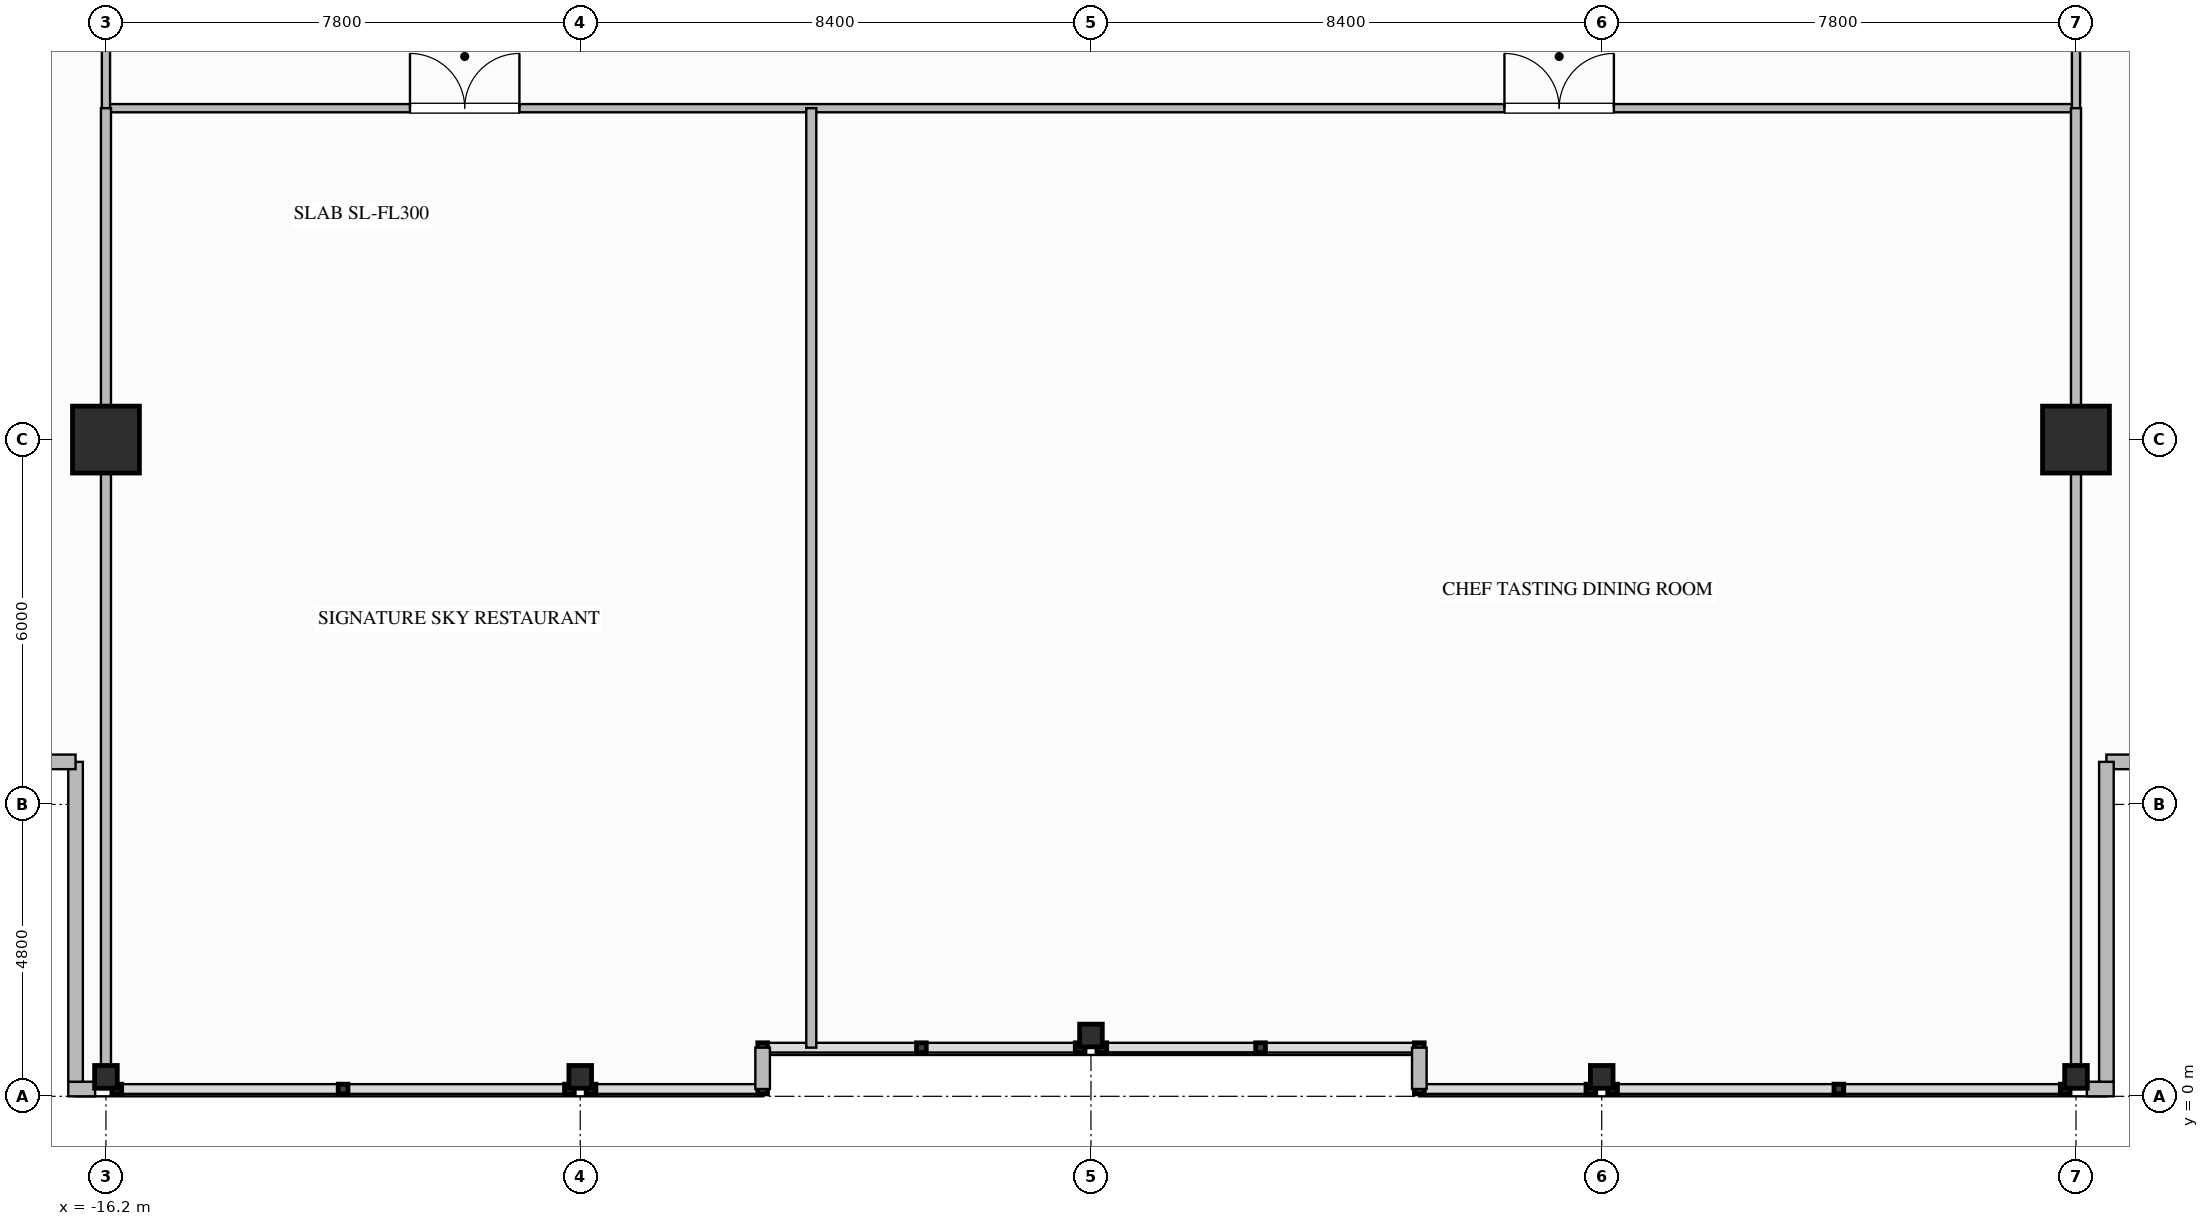
"""IFC4 building model, lengths in metres.
Left out: names, types, materials, properties, quantities, classifications, styles, units other than length and angle.
Written with IfcOpenShell. Run it as: python <this file> out.ifc"""

import sys

from ifc_helpers import new_model, si_unit, direction, frame, frame_2d, origin, origin_2d, place, context, subcontext, project, spatial, rectangle, i_section, extrude, element, fill, save


model = new_model("IFC4")
c1 = context("Model", 3, precision=1e-05, world=origin(), true_north=direction((0.0, 1.0)))
c2 = subcontext(c1, "Body", "Model", "MODEL_VIEW")
j1 = project(units=[si_unit("LENGTHUNIT", "METRE"), si_unit("PLANEANGLEUNIT", "RADIAN")], contexts=[c1])
p1 = place(None, origin())
s1 = spatial("IfcSite", under=j1, at=p1, CompositionType="ELEMENT")
p2 = place(p1, origin())
s2 = spatial("IfcBuilding", under=s1, at=p2, CompositionType="ELEMENT")
p3 = place(p2, frame((0.0, 0.0, 255.5)))
s3 = spatial("IfcBuildingStorey", under=s2, at=p3, CompositionType="ELEMENT", Elevation=255.5)
for number, where, z_axis, x_axis in (
    (1, (-16.2, 10.8, 0.0), (0.0, 0.0, 1.0), (1.0, 0.0, 0.0)),
    (2, (16.2, 10.8, 0.0), (0.0, 0.0, 1.0), (1.0, 0.0, 0.0)),
):
    element("IfcColumn", number, at=place(p3, frame(where, z_axis=z_axis, x_axis=x_axis)), inside=s3, PredefinedType="COLUMN", context=c2, shape_type="SweptSolid", body=[
        extrude(rectangle(XDim=1.1, YDim=1.1, at=origin_2d()), origin(), (0.0, 0.0, 1.0), 4.5),
    ])
for number, where, z_axis, x_axis in (
    (3, (-16.2, 0.32, 0.0), (0.0, 0.0, 1.0), (0.0, 1.0, 0.0)),
    (4, (-8.4, 0.32, 0.0), (0.0, 0.0, 1.0), (0.0, 1.0, 0.0)),
    (5, (0.0, 1.0, 0.0), (0.0, 0.0, 1.0), (0.0, 1.0, 0.0)),
    (6, (8.4, 0.32, 0.0), (0.0, 0.0, 1.0), (0.0, 1.0, 0.0)),
    (7, (16.2, 0.32, 0.0), (0.0, 0.0, 1.0), (0.0, 1.0, 0.0)),
):
    element("IfcColumn", number, at=place(p3, frame(where, z_axis=z_axis, x_axis=x_axis)), inside=s3, PredefinedType="COLUMN", context=c2, shape_type="SweptSolid", body=[
        extrude(i_section(OverallWidth=0.374, OverallDepth=0.372, WebThickness=0.016, FlangeThickness=0.026, FilletRadius=0.025, at=origin_2d()), origin(), (0.0, 0.0, 1.0), 4.497),
    ])
for number, where, z_axis, x_axis in (
    (8, (16.82, 0.12, 0.0), (0.0, 0.0, 1.0), (-1.0, 0.0, 0.0)),
    (9, (-16.378, 0.12, 0.0), (0.0, 0.0, 1.0), (-1.0, 0.0, 0.0)),
):
    element("IfcWall", number, at=place(p3, frame(where, z_axis=z_axis, x_axis=x_axis)), inside=s3, PredefinedType="STANDARD", context=c2, shape_type="SweptSolid", body=[
        extrude(rectangle(XDim=0.442, YDim=0.24, at=frame_2d((0.221, 0.0))), origin(), (0.0, 0.0, 1.0), 4.18),
    ])
p4 = place(p3, frame((-16.7, 0.24, 0.0), z_axis=(0.0, 0.0, 1.0), x_axis=(0.0, 1.0, 0.0)))
e10 = element("IfcWall", 10, at=p4, inside=s3, PredefinedType="STANDARD", context=c2, shape_type="SweptSolid", body=[
    extrude(rectangle(XDim=5.26, YDim=0.24, at=frame_2d((2.63, 0.0))), origin(), (0.0, 0.0, 1.0), 4.18),
])
for number, where, z_axis, x_axis in (
    (11, (-16.7, 5.5, 0.0), (0.0, 0.0, 1.0), (-1.0, 0.0, 0.0)),
    (12, (22.08, 5.5, 0.0), (0.0, 0.0, 1.0), (-1.0, 0.0, 0.0)),
):
    element("IfcWall", number, at=place(p3, frame(where, z_axis=z_axis, x_axis=x_axis)), inside=s3, PredefinedType="STANDARD", context=c2, shape_type="SweptSolid", body=[
        extrude(rectangle(XDim=5.38, YDim=0.24, at=frame_2d((2.69, 0.0))), origin(), (0.0, 0.0, 1.0), 4.18),
    ])
p5 = place(p3, frame((16.7, 5.5, 0.0), z_axis=(0.0, 0.0, 1.0), x_axis=(0.0, -1.0, 0.0)))
e13 = element("IfcWall", 13, at=p5, inside=s3, PredefinedType="STANDARD", context=c2, shape_type="SweptSolid", body=[
    extrude(rectangle(XDim=5.26, YDim=0.24, at=frame_2d((2.63, 0.0))), origin(), (0.0, 0.0, 1.0), 4.18),
])
for number, where, z_axis, x_axis in (
    (14, (5.4, 0.12, 0.0), (0.0, 0.0, 1.0), (0.0, 1.0, 0.0)),
    (15, (-5.4, 0.8, 0.0), (0.0, 0.0, 1.0), (0.0, -1.0, 0.0)),
):
    element("IfcWall", number, at=place(p3, frame(where, z_axis=z_axis, x_axis=x_axis)), inside=s3, PredefinedType="STANDARD", context=c2, shape_type="SweptSolid", body=[
        extrude(rectangle(XDim=0.68, YDim=0.24, at=frame_2d((0.34, 0.0))), origin(), (0.0, 0.0, 1.0), 4.18),
    ])
p6 = place(p3, frame((-16.2, 16.25, 0.0), z_axis=(0.0, 0.0, 1.0), x_axis=(1.0, 0.0, 0.0)))
e16 = element("IfcWall", 16, at=p6, inside=s3, PredefinedType="PARTITIONING", context=c2, shape_type="SweptSolid", body=[
    extrude(rectangle(XDim=32.4, YDim=0.135, at=frame_2d((16.2, 0.0))), origin(), (0.0, 0.0, 1.0), 4.18),
])
p7 = place(p6, frame((5.0, 0.0, 0.0)))
e17 = element("IfcOpeningElement", 17, at=p7, cuts=e16, PredefinedType="OPENING", context=c2, shape_type="SweptSolid", body=[
    extrude(rectangle(XDim=1.8, YDim=2.35, at=frame_2d((0.9, 1.175))), frame((0.0, 0.077, 0.0), z_axis=(0.0, -1.0, 0.0), x_axis=(1.0, 0.0, 0.0)), (0.0, 0.0, 1.0), 0.155),
])
p8 = place(p6, frame((23.0, 0.0, 0.0)))
e18 = element("IfcOpeningElement", 18, at=p8, cuts=e16, PredefinedType="OPENING", context=c2, shape_type="SweptSolid", body=[
    extrude(rectangle(XDim=1.8, YDim=2.35, at=frame_2d((0.9, 1.175))), frame((0.0, 0.077, 0.0), z_axis=(0.0, -1.0, 0.0), x_axis=(1.0, 0.0, 0.0)), (0.0, 0.0, 1.0), 0.155),
])
for number, where, z_axis, x_axis in (
    (19, (-16.2, 16.25, 0.0), (0.0, 0.0, 1.0), (0.0, 1.0, 0.0)),
    (20, (16.2, 16.25, 0.0), (0.0, 0.0, 1.0), (0.0, 1.0, 0.0)),
):
    element("IfcWall", number, at=place(p3, frame(where, z_axis=z_axis, x_axis=x_axis)), inside=s3, PredefinedType="PARTITIONING", context=c2, shape_type="SweptSolid", body=[
        extrude(rectangle(XDim=2.15, YDim=0.135, at=frame_2d((1.075, 0.0))), origin(), (0.0, 0.0, 1.0), 3.554),
    ])
for number, where, z_axis, x_axis in (
    (21, (-16.2, 0.12, 0.0), (0.0, 0.0, 1.0), (0.0, 1.0, 0.0)),
    (22, (16.2, 0.12, 0.0), (0.0, 0.0, 1.0), (0.0, 1.0, 0.0)),
):
    element("IfcWall", number, at=place(p3, frame(where, z_axis=z_axis, x_axis=x_axis)), inside=s3, PredefinedType="PARTITIONING", context=c2, shape_type="SweptSolid", body=[
        extrude(rectangle(XDim=16.13, YDim=0.165, at=frame_2d((8.065, 0.0))), origin(), (0.0, 0.0, 1.0), 3.554),
    ])
p9 = place(p3, frame((-4.6, 0.8, 0.0), z_axis=(0.0, 0.0, 1.0), x_axis=(0.0, 1.0, 0.0)))
e23 = element("IfcWall", 23, at=p9, inside=s3, PredefinedType="PARTITIONING", context=c2, shape_type="SweptSolid", body=[
    extrude(rectangle(XDim=15.45, YDim=0.165, at=frame_2d((7.725, 0.0))), origin(), (0.0, 0.0, 1.0), 4.18),
])
p10 = place(p7, origin())
e24 = element("IfcDoor", 24, at=p10, inside=s3, OperationType="DOUBLE_DOOR_SINGLE_SWING", PredefinedType="DOOR", context=c2, shape_type="SweptSolid", body=[
    extrude(rectangle(XDim=1.8, YDim=2.35, at=frame_2d((0.9, 1.175))), frame((0.0, 0.025, 0.0), z_axis=(0.0, -1.0, 0.0), x_axis=(1.0, 0.0, 0.0)), (0.0, 0.0, 1.0), 0.05),
])
fill(e17, e24)
p11 = place(p8, origin())
e25 = element("IfcDoor", 25, at=p11, inside=s3, OperationType="DOUBLE_DOOR_SINGLE_SWING", PredefinedType="DOOR", context=c2, shape_type="SweptSolid", body=[
    extrude(rectangle(XDim=1.8, YDim=2.35, at=frame_2d((0.9, 1.175))), frame((0.0, 0.025, 0.0), z_axis=(0.0, -1.0, 0.0), x_axis=(1.0, 0.0, 0.0)), (0.0, 0.0, 1.0), 0.05),
])
fill(e18, e25)
save(model, sys.argv[1])
